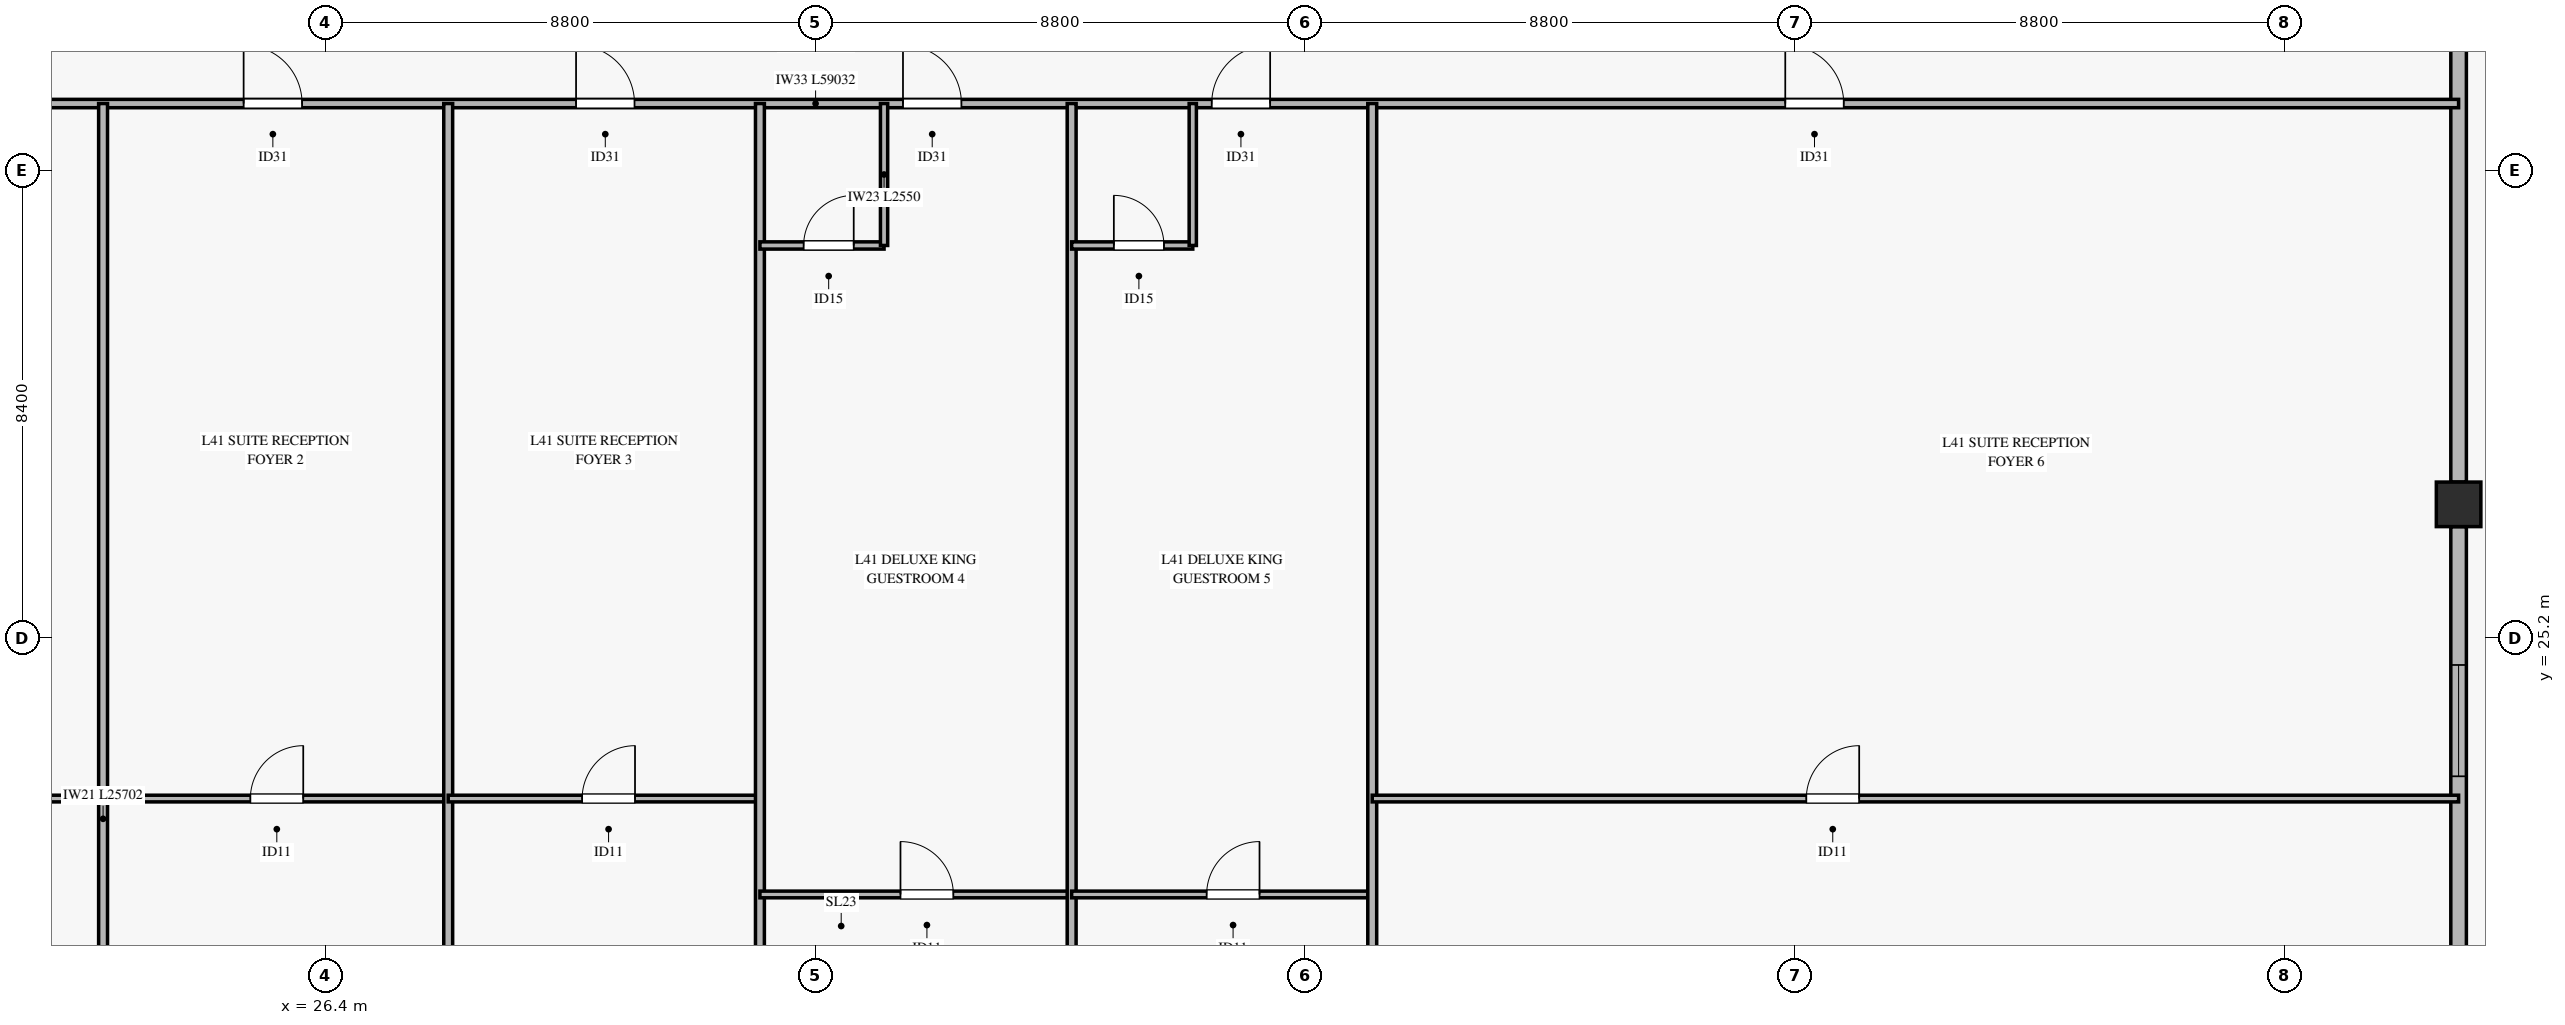
"""IFC4 building model, lengths in metres.
Left out: names, types, materials, properties, quantities, classifications, styles, units other than length and angle.
Written with IfcOpenShell. Run it as: python <this file> out.ifc"""

import sys

from ifc_helpers import new_model, si_unit, direction, frame, frame_2d, origin, origin_2d, place, context, subcontext, project, spatial, rectangle, hollow_rectangle, extrude, source, transform, mapped, element, fill, save


model = new_model("IFC4")
c1 = context("Model", 3, precision=1e-05, world=origin(), true_north=direction((0.0, 1.0)))
c2 = subcontext(c1, "Body", "Model", "MODEL_VIEW")
j1 = project(units=[si_unit("LENGTHUNIT", "METRE"), si_unit("PLANEANGLEUNIT", "RADIAN")], contexts=[c1])
p1 = place(None, origin())
s1 = spatial("IfcSite", under=j1, at=p1, CompositionType="ELEMENT")
p2 = place(p1, origin())
s2 = spatial("IfcBuilding", under=s1, at=p2, CompositionType="ELEMENT")
p3 = place(p2, frame((0.0, 0.0, 166.7)))
s3 = spatial("IfcBuildingStorey", under=s2, at=p3, CompositionType="ELEMENT", Elevation=166.7)
m1 = source(origin(), c2, "Body", "SweptSolid", [
    extrude(hollow_rectangle(XDim=0.8, YDim=0.8, WallThickness=0.036, at=origin_2d()), origin(), (0.0, 0.0, 1.0), 3.289),
])
p4 = place(p3, frame((64.716, 27.599, 0.0), z_axis=(-0.071481516224, 0.08024041437, 0.9942091675), x_axis=(-0.746684793699, -0.66517803546, 0.0)))
e1 = element("IfcColumn", 1, at=p4, inside=s3, PredefinedType="COLUMN", context=c2, shape_type="MappedRepresentation", body=[
    mapped(m1, transform((0.0, 0.0, 0.0), x_axis=(1.0, 0.0, 0.0), y_axis=(0.0, 1.0, 0.0), z_axis=(0.0, 0.0, 1.0), scale=1.0)),
])
p5 = place(p3, frame((64.716, 12.011, 0.0), z_axis=(0.0, 0.0, 1.0), x_axis=(0.0, 1.0, 0.0)))
e2 = element("IfcWall", 2, at=p5, inside=s3, PredefinedType="SOLIDWALL", context=c2, shape_type="SweptSolid", body=[
    extrude(rectangle(XDim=15.188, YDim=0.28, at=frame_2d((7.594, 0.0))), origin(), (0.0, 0.0, 1.0), 2.75),
])
p6 = place(p5, frame((3.189, 0.0, 0.45)))
e3 = element("IfcOpeningElement", 3, at=p6, cuts=e2, PredefinedType="OPENING", context=c2, shape_type="SweptSolid", body=[
    extrude(rectangle(XDim=2.0, YDim=2.0, at=frame_2d((1.0, 1.0))), frame((0.0, 0.15, 0.0), z_axis=(0.0, -1.0, 0.0), x_axis=(1.0, 0.0, 0.0)), (0.0, 0.0, 1.0), 0.3),
])
p7 = place(p5, frame((10.702, 0.0, 0.45)))
e4 = element("IfcOpeningElement", 4, at=p7, cuts=e2, PredefinedType="OPENING", context=c2, shape_type="SweptSolid", body=[
    extrude(rectangle(XDim=2.0, YDim=2.0, at=frame_2d((1.0, 1.0))), frame((0.0, 0.15, 0.0), z_axis=(0.0, -1.0, 0.0), x_axis=(1.0, 0.0, 0.0)), (0.0, 0.0, 1.0), 0.3),
])
p8 = place(p3, frame((64.716, 27.999, 0.0), z_axis=(0.0, 0.0, 1.0), x_axis=(0.0, 1.0, 0.0)))
e5 = element("IfcWall", 5, at=p8, inside=s3, PredefinedType="SOLIDWALL", context=c2, shape_type="SweptSolid", body=[
    extrude(rectangle(XDim=15.188, YDim=0.28, at=frame_2d((7.594, 0.0))), origin(), (0.0, 0.0, 1.0), 2.75),
])
p9 = place(p8, frame((9.856, 0.0, 0.45)))
e6 = element("IfcOpeningElement", 6, at=p9, cuts=e5, PredefinedType="OPENING", context=c2, shape_type="SweptSolid", body=[
    extrude(rectangle(XDim=2.0, YDim=2.0, at=frame_2d((1.0, 1.0))), frame((0.0, 0.15, 0.0), z_axis=(0.0, -1.0, 0.0), x_axis=(1.0, 0.0, 0.0)), (0.0, 0.0, 1.0), 0.3),
])
p10 = place(p3, frame((5.684, 34.8, 0.0), z_axis=(0.0, 0.0, 1.0), x_axis=(1.0, 0.0, 0.0)))
e7 = element("IfcWall", 7, at=p10, inside=s3, PredefinedType="PARTITIONING", context=c2, shape_type="SweptSolid", body=[
    extrude(rectangle(XDim=59.032, YDim=0.15, at=frame_2d((29.516, 0.0))), origin(), (0.0, 0.0, 1.0), 2.455),
])
p11 = place(p10, frame((6.791, 0.0, 0.0)))
e8 = element("IfcOpeningElement", 8, at=p11, cuts=e7, PredefinedType="OPENING", context=c2, shape_type="SweptSolid", body=[
    extrude(rectangle(XDim=1.05, YDim=2.15, at=frame_2d((0.525, 1.075))), frame((0.0, 0.085, 0.0), z_axis=(0.0, -1.0, 0.0), x_axis=(1.0, 0.0, 0.0)), (0.0, 0.0, 1.0), 0.17),
])
p12 = place(p10, frame((19.241, 0.0, 0.0)))
e9 = element("IfcOpeningElement", 9, at=p12, cuts=e7, PredefinedType="OPENING", context=c2, shape_type="SweptSolid", body=[
    extrude(rectangle(XDim=1.05, YDim=2.15, at=frame_2d((0.525, 1.075))), frame((0.0, 0.085, 0.0), z_axis=(0.0, -1.0, 0.0), x_axis=(1.0, 0.0, 0.0)), (0.0, 0.0, 1.0), 0.17),
])
p13 = place(p10, frame((25.213, 0.0, 0.0)))
e10 = element("IfcOpeningElement", 10, at=p13, cuts=e7, PredefinedType="OPENING", context=c2, shape_type="SweptSolid", body=[
    extrude(rectangle(XDim=1.05, YDim=2.15, at=frame_2d((0.525, 1.075))), frame((0.0, 0.085, 0.0), z_axis=(0.0, -1.0, 0.0), x_axis=(1.0, 0.0, 0.0)), (0.0, 0.0, 1.0), 0.17),
])
p14 = place(p10, frame((31.086, 0.0, 0.0)))
e11 = element("IfcOpeningElement", 11, at=p14, cuts=e7, PredefinedType="OPENING", context=c2, shape_type="SweptSolid", body=[
    extrude(rectangle(XDim=1.05, YDim=2.15, at=frame_2d((0.525, 1.075))), frame((0.0, 0.085, 0.0), z_axis=(0.0, -1.0, 0.0), x_axis=(1.0, 0.0, 0.0)), (0.0, 0.0, 1.0), 0.17),
])
p15 = place(p10, frame((36.632, 0.0, 0.0)))
e12 = element("IfcOpeningElement", 12, at=p15, cuts=e7, PredefinedType="OPENING", context=c2, shape_type="SweptSolid", body=[
    extrude(rectangle(XDim=1.05, YDim=2.15, at=frame_2d((0.525, 1.075))), frame((0.0, 0.085, 0.0), z_axis=(0.0, -1.0, 0.0), x_axis=(1.0, 0.0, 0.0)), (0.0, 0.0, 1.0), 0.17),
])
p16 = place(p10, frame((46.936, 0.0, 0.0)))
e13 = element("IfcOpeningElement", 13, at=p16, cuts=e7, PredefinedType="OPENING", context=c2, shape_type="SweptSolid", body=[
    extrude(rectangle(XDim=1.05, YDim=2.15, at=frame_2d((0.525, 1.075))), frame((0.0, 0.085, 0.0), z_axis=(0.0, -1.0, 0.0), x_axis=(1.0, 0.0, 0.0)), (0.0, 0.0, 1.0), 0.17),
])
p17 = place(p3, frame((5.684, 22.313, 0.0), z_axis=(0.0, 0.0, 1.0), x_axis=(1.0, 0.0, 0.0)))
e14 = element("IfcWall", 14, at=p17, inside=s3, PredefinedType="PARTITIONING", context=c2, shape_type="SweptSolid", body=[
    extrude(rectangle(XDim=16.716, YDim=0.12, at=frame_2d((8.358, 0.0))), origin(), (0.0, 0.0, 1.0), 2.455),
])
p18 = place(p17, frame((7.113, 0.0, 0.0)))
e15 = element("IfcOpeningElement", 15, at=p18, cuts=e14, PredefinedType="OPENING", context=c2, shape_type="SweptSolid", body=[
    extrude(rectangle(XDim=0.95, YDim=2.1, at=frame_2d((0.475, 1.05))), frame((0.0, 0.07, 0.0), z_axis=(0.0, -1.0, 0.0), x_axis=(1.0, 0.0, 0.0)), (0.0, 0.0, 1.0), 0.14),
])
p19 = place(p3, frame((22.4, 9.098, 0.0), z_axis=(0.0, 0.0, 1.0), x_axis=(0.0, 1.0, 0.0)))
e16 = element("IfcWall", 16, at=p19, inside=s3, PredefinedType="PARTITIONING", context=c2, shape_type="SweptSolid", body=[
    extrude(rectangle(XDim=25.702, YDim=0.16, at=frame_2d((12.851, 0.0))), origin(), (0.0, 0.0, 1.0), 2.755),
])
p20 = place(p3, frame((22.4, 22.313, 0.0), z_axis=(0.0, 0.0, 1.0), x_axis=(1.0, 0.0, 0.0)))
e17 = element("IfcWall", 17, at=p20, inside=s3, PredefinedType="PARTITIONING", context=c2, shape_type="SweptSolid", body=[
    extrude(rectangle(XDim=6.2, YDim=0.12, at=frame_2d((3.1, 0.0))), origin(), (0.0, 0.0, 1.0), 3.27),
])
p21 = place(p20, frame((2.646, 0.0, 0.0)))
e18 = element("IfcOpeningElement", 18, at=p21, cuts=e17, PredefinedType="OPENING", context=c2, shape_type="SweptSolid", body=[
    extrude(rectangle(XDim=0.95, YDim=2.1, at=frame_2d((0.475, 1.05))), frame((0.0, 0.07, 0.0), z_axis=(0.0, -1.0, 0.0), x_axis=(1.0, 0.0, 0.0)), (0.0, 0.0, 1.0), 0.14),
])
p22 = place(p3, frame((28.6, 9.098, 0.0), z_axis=(0.0, 0.0, 1.0), x_axis=(0.0, 1.0, 0.0)))
e19 = element("IfcWall", 19, at=p22, inside=s3, PredefinedType="PARTITIONING", context=c2, shape_type="SweptSolid", body=[
    extrude(rectangle(XDim=25.702, YDim=0.16, at=frame_2d((12.851, 0.0))), origin(), (0.0, 0.0, 1.0), 2.755),
])
p23 = place(p3, frame((28.6, 22.313, 0.0), z_axis=(0.0, 0.0, 1.0), x_axis=(1.0, 0.0, 0.0)))
e20 = element("IfcWall", 20, at=p23, inside=s3, PredefinedType="PARTITIONING", context=c2, shape_type="SweptSolid", body=[
    extrude(rectangle(XDim=5.6, YDim=0.12, at=frame_2d((2.8, 0.0))), origin(), (0.0, 0.0, 1.0), 2.455),
])
p24 = place(p23, frame((2.406, 0.0, 0.0)))
e21 = element("IfcOpeningElement", 21, at=p24, cuts=e20, PredefinedType="OPENING", context=c2, shape_type="SweptSolid", body=[
    extrude(rectangle(XDim=0.95, YDim=2.1, at=frame_2d((0.475, 1.05))), frame((0.0, 0.07, 0.0), z_axis=(0.0, -1.0, 0.0), x_axis=(1.0, 0.0, 0.0)), (0.0, 0.0, 1.0), 0.14),
])
p25 = place(p3, frame((34.2, 9.098, 0.0), z_axis=(0.0, 0.0, 1.0), x_axis=(0.0, 1.0, 0.0)))
e22 = element("IfcWall", 22, at=p25, inside=s3, PredefinedType="PARTITIONING", context=c2, shape_type="SweptSolid", body=[
    extrude(rectangle(XDim=25.702, YDim=0.16, at=frame_2d((12.851, 0.0))), origin(), (0.0, 0.0, 1.0), 2.755),
])
p26 = place(p3, frame((34.2, 32.25, 0.0), z_axis=(0.0, 0.0, 1.0), x_axis=(1.0, 0.0, 0.0)))
e23 = element("IfcWall", 23, at=p26, inside=s3, PredefinedType="PARTITIONING", context=c2, shape_type="SweptSolid", body=[
    extrude(rectangle(XDim=2.23, YDim=0.13, at=frame_2d((1.115, 0.0))), origin(), (0.0, 0.0, 1.0), 3.27),
])
p27 = place(p26, frame((0.785, 0.0, 0.0)))
e24 = element("IfcOpeningElement", 24, at=p27, cuts=e23, PredefinedType="OPENING", context=c2, shape_type="SweptSolid", body=[
    extrude(rectangle(XDim=0.9, YDim=2.1, at=frame_2d((0.45, 1.05))), frame((0.0, 0.075, 0.0), z_axis=(0.0, -1.0, 0.0), x_axis=(1.0, 0.0, 0.0)), (0.0, 0.0, 1.0), 0.15),
])
p28 = place(p3, frame((36.43, 32.25, 0.0), z_axis=(0.0, 0.0, 1.0), x_axis=(0.0, 1.0, 0.0)))
e25 = element("IfcWall", 25, at=p28, inside=s3, PredefinedType="PARTITIONING", context=c2, shape_type="SweptSolid", body=[
    extrude(rectangle(XDim=2.55, YDim=0.13, at=frame_2d((1.275, 0.0))), origin(), (0.0, 0.0, 1.0), 2.805),
])
p29 = place(p3, frame((34.2, 20.59, 0.0), z_axis=(0.0, 0.0, 1.0), x_axis=(1.0, 0.0, 0.0)))
e26 = element("IfcWall", 26, at=p29, inside=s3, PredefinedType="PARTITIONING", context=c2, shape_type="SweptSolid", body=[
    extrude(rectangle(XDim=5.6, YDim=0.12, at=frame_2d((2.8, 0.0))), origin(), (0.0, 0.0, 1.0), 2.455),
])
p30 = place(p29, frame((2.525, 0.0, 0.0)))
e27 = element("IfcOpeningElement", 27, at=p30, cuts=e26, PredefinedType="OPENING", context=c2, shape_type="SweptSolid", body=[
    extrude(rectangle(XDim=0.95, YDim=2.1, at=frame_2d((0.475, 1.05))), frame((0.0, 0.07, 0.0), z_axis=(0.0, -1.0, 0.0), x_axis=(1.0, 0.0, 0.0)), (0.0, 0.0, 1.0), 0.14),
])
p31 = place(p3, frame((39.8, 9.098, 0.0), z_axis=(0.0, 0.0, 1.0), x_axis=(0.0, 1.0, 0.0)))
e28 = element("IfcWall", 28, at=p31, inside=s3, PredefinedType="PARTITIONING", context=c2, shape_type="SweptSolid", body=[
    extrude(rectangle(XDim=25.702, YDim=0.16, at=frame_2d((12.851, 0.0))), origin(), (0.0, 0.0, 1.0), 2.755),
])
p32 = place(p3, frame((39.8, 32.25, 0.0), z_axis=(0.0, 0.0, 1.0), x_axis=(1.0, 0.0, 0.0)))
e29 = element("IfcWall", 29, at=p32, inside=s3, PredefinedType="PARTITIONING", context=c2, shape_type="SweptSolid", body=[
    extrude(rectangle(XDim=2.176, YDim=0.13, at=frame_2d((1.088, 0.0))), origin(), (0.0, 0.0, 1.0), 3.27),
])
p33 = place(p32, frame((0.758, 0.0, 0.0)))
e30 = element("IfcOpeningElement", 30, at=p33, cuts=e29, PredefinedType="OPENING", context=c2, shape_type="SweptSolid", body=[
    extrude(rectangle(XDim=0.9, YDim=2.1, at=frame_2d((0.45, 1.05))), frame((0.0, 0.075, 0.0), z_axis=(0.0, -1.0, 0.0), x_axis=(1.0, 0.0, 0.0)), (0.0, 0.0, 1.0), 0.15),
])
p34 = place(p3, frame((41.976, 32.25, 0.0), z_axis=(0.0, 0.0, 1.0), x_axis=(0.0, 1.0, 0.0)))
e31 = element("IfcWall", 31, at=p34, inside=s3, PredefinedType="PARTITIONING", context=c2, shape_type="SweptSolid", body=[
    extrude(rectangle(XDim=2.55, YDim=0.13, at=frame_2d((1.275, 0.0))), origin(), (0.0, 0.0, 1.0), 2.805),
])
p35 = place(p3, frame((39.8, 20.59, 0.0), z_axis=(0.0, 0.0, 1.0), x_axis=(1.0, 0.0, 0.0)))
e32 = element("IfcWall", 32, at=p35, inside=s3, PredefinedType="PARTITIONING", context=c2, shape_type="SweptSolid", body=[
    extrude(rectangle(XDim=5.4, YDim=0.12, at=frame_2d((2.7, 0.0))), origin(), (0.0, 0.0, 1.0), 2.455),
])
p36 = place(p35, frame((2.425, 0.0, 0.0)))
e33 = element("IfcOpeningElement", 33, at=p36, cuts=e32, PredefinedType="OPENING", context=c2, shape_type="SweptSolid", body=[
    extrude(rectangle(XDim=0.95, YDim=2.1, at=frame_2d((0.475, 1.05))), frame((0.0, 0.07, 0.0), z_axis=(0.0, -1.0, 0.0), x_axis=(1.0, 0.0, 0.0)), (0.0, 0.0, 1.0), 0.14),
])
p37 = place(p3, frame((45.2, 9.098, 0.0), z_axis=(0.0, 0.0, 1.0), x_axis=(0.0, 1.0, 0.0)))
e34 = element("IfcWall", 34, at=p37, inside=s3, PredefinedType="PARTITIONING", context=c2, shape_type="SweptSolid", body=[
    extrude(rectangle(XDim=25.702, YDim=0.16, at=frame_2d((12.851, 0.0))), origin(), (0.0, 0.0, 1.0), 2.755),
])
p38 = place(p3, frame((45.2, 22.313, 0.0), z_axis=(0.0, 0.0, 1.0), x_axis=(1.0, 0.0, 0.0)))
e35 = element("IfcWall", 35, at=p38, inside=s3, PredefinedType="PARTITIONING", context=c2, shape_type="SweptSolid", body=[
    extrude(rectangle(XDim=19.516, YDim=0.12, at=frame_2d((9.758, 0.0))), origin(), (0.0, 0.0, 1.0), 2.455),
])
p39 = place(p38, frame((7.798, 0.0, 0.0)))
e36 = element("IfcOpeningElement", 36, at=p39, cuts=e35, PredefinedType="OPENING", context=c2, shape_type="SweptSolid", body=[
    extrude(rectangle(XDim=0.95, YDim=2.1, at=frame_2d((0.475, 1.05))), frame((0.0, 0.07, 0.0), z_axis=(0.0, -1.0, 0.0), x_axis=(1.0, 0.0, 0.0)), (0.0, 0.0, 1.0), 0.14),
])
m2 = source(origin(), c2, "Body", "SweptSolid", [
    extrude(rectangle(XDim=2.0, YDim=2.0, at=frame_2d((1.0, 1.0))), frame((0.0, 0.03, 0.0), z_axis=(0.0, -1.0, 0.0), x_axis=(1.0, 0.0, 0.0)), (0.0, 0.0, 1.0), 0.06),
])
p40 = place(p7, origin())
e37 = element("IfcWindow", 37, at=p40, inside=s3, PartitioningType="SINGLE_PANEL", PredefinedType="WINDOW", context=c2, shape_type="MappedRepresentation", body=[
    mapped(m2, transform((0.0, 0.0, 0.0), x_axis=(1.0, 0.0, 0.0), y_axis=(0.0, 1.0, 0.0), z_axis=(0.0, 0.0, 1.0), scale=1.0)),
])
fill(e4, e37)
m3 = source(origin(), c2, "Body", "SweptSolid", [
    extrude(rectangle(XDim=1.05, YDim=2.15, at=frame_2d((0.525, 1.075))), frame((0.0, 0.025, 0.0), z_axis=(0.0, -1.0, 0.0), x_axis=(1.0, 0.0, 0.0)), (0.0, 0.0, 1.0), 0.05),
])
p41 = place(p12, origin())
e38 = element("IfcDoor", 38, at=p41, inside=s3, OperationType="SINGLE_SWING_LEFT", PredefinedType="DOOR", context=c2, shape_type="MappedRepresentation", body=[
    mapped(m3, transform((0.0, 0.0, 0.0), x_axis=(1.0, 0.0, 0.0), y_axis=(0.0, 1.0, 0.0), z_axis=(0.0, 0.0, 1.0), scale=1.0)),
])
fill(e9, e38)
m4 = source(origin(), c2, "Body", "SweptSolid", [
    extrude(rectangle(XDim=0.95, YDim=2.1, at=frame_2d((0.475, 1.05))), frame((0.0, 0.025, 0.0), z_axis=(0.0, -1.0, 0.0), x_axis=(1.0, 0.0, 0.0)), (0.0, 0.0, 1.0), 0.05),
])
p42 = place(p21, origin())
e39 = element("IfcDoor", 39, at=p42, inside=s3, OperationType="SINGLE_SWING_RIGHT", PredefinedType="DOOR", context=c2, shape_type="MappedRepresentation", body=[
    mapped(m4, transform((0.0, 0.0, 0.0), x_axis=(1.0, 0.0, 0.0), y_axis=(0.0, 1.0, 0.0), z_axis=(0.0, 0.0, 1.0), scale=1.0)),
])
fill(e18, e39)
p43 = place(p13, origin())
e40 = element("IfcDoor", 40, at=p43, inside=s3, OperationType="SINGLE_SWING_LEFT", PredefinedType="DOOR", context=c2, shape_type="MappedRepresentation", body=[
    mapped(m3, transform((0.0, 0.0, 0.0), x_axis=(1.0, 0.0, 0.0), y_axis=(0.0, 1.0, 0.0), z_axis=(0.0, 0.0, 1.0), scale=1.0)),
])
fill(e10, e40)
p44 = place(p24, origin())
e41 = element("IfcDoor", 41, at=p44, inside=s3, OperationType="SINGLE_SWING_RIGHT", PredefinedType="DOOR", context=c2, shape_type="MappedRepresentation", body=[
    mapped(m4, transform((0.0, 0.0, 0.0), x_axis=(1.0, 0.0, 0.0), y_axis=(0.0, 1.0, 0.0), z_axis=(0.0, 0.0, 1.0), scale=1.0)),
])
fill(e21, e41)
p45 = place(p14, origin())
e42 = element("IfcDoor", 42, at=p45, inside=s3, OperationType="SINGLE_SWING_LEFT", PredefinedType="DOOR", context=c2, shape_type="MappedRepresentation", body=[
    mapped(m3, transform((0.0, 0.0, 0.0), x_axis=(1.0, 0.0, 0.0), y_axis=(0.0, 1.0, 0.0), z_axis=(0.0, 0.0, 1.0), scale=1.0)),
])
fill(e11, e42)
m5 = source(origin(), c2, "Body", "SweptSolid", [
    extrude(rectangle(XDim=0.9, YDim=2.1, at=frame_2d((0.45, 1.05))), frame((0.0, 0.025, 0.0), z_axis=(0.0, -1.0, 0.0), x_axis=(1.0, 0.0, 0.0)), (0.0, 0.0, 1.0), 0.05),
])
p46 = place(p27, origin())
e43 = element("IfcDoor", 43, at=p46, inside=s3, OperationType="SINGLE_SWING_RIGHT", PredefinedType="DOOR", context=c2, shape_type="MappedRepresentation", body=[
    mapped(m5, transform((0.0, 0.0, 0.0), x_axis=(1.0, 0.0, 0.0), y_axis=(0.0, 1.0, 0.0), z_axis=(0.0, 0.0, 1.0), scale=1.0)),
])
fill(e24, e43)
p47 = place(p30, origin())
e44 = element("IfcDoor", 44, at=p47, inside=s3, OperationType="SINGLE_SWING_LEFT", PredefinedType="DOOR", context=c2, shape_type="MappedRepresentation", body=[
    mapped(m4, transform((0.0, 0.0, 0.0), x_axis=(1.0, 0.0, 0.0), y_axis=(0.0, 1.0, 0.0), z_axis=(0.0, 0.0, 1.0), scale=1.0)),
])
fill(e27, e44)
p48 = place(p15, origin())
e45 = element("IfcDoor", 45, at=p48, inside=s3, OperationType="SINGLE_SWING_RIGHT", PredefinedType="DOOR", context=c2, shape_type="MappedRepresentation", body=[
    mapped(m3, transform((0.0, 0.0, 0.0), x_axis=(1.0, 0.0, 0.0), y_axis=(0.0, 1.0, 0.0), z_axis=(0.0, 0.0, 1.0), scale=1.0)),
])
fill(e12, e45)
p49 = place(p33, origin())
e46 = element("IfcDoor", 46, at=p49, inside=s3, OperationType="SINGLE_SWING_LEFT", PredefinedType="DOOR", context=c2, shape_type="MappedRepresentation", body=[
    mapped(m5, transform((0.0, 0.0, 0.0), x_axis=(1.0, 0.0, 0.0), y_axis=(0.0, 1.0, 0.0), z_axis=(0.0, 0.0, 1.0), scale=1.0)),
])
fill(e30, e46)
p50 = place(p36, origin())
e47 = element("IfcDoor", 47, at=p50, inside=s3, OperationType="SINGLE_SWING_RIGHT", PredefinedType="DOOR", context=c2, shape_type="MappedRepresentation", body=[
    mapped(m4, transform((0.0, 0.0, 0.0), x_axis=(1.0, 0.0, 0.0), y_axis=(0.0, 1.0, 0.0), z_axis=(0.0, 0.0, 1.0), scale=1.0)),
])
fill(e33, e47)
p51 = place(p16, origin())
e48 = element("IfcDoor", 48, at=p51, inside=s3, OperationType="SINGLE_SWING_LEFT", PredefinedType="DOOR", context=c2, shape_type="MappedRepresentation", body=[
    mapped(m3, transform((0.0, 0.0, 0.0), x_axis=(1.0, 0.0, 0.0), y_axis=(0.0, 1.0, 0.0), z_axis=(0.0, 0.0, 1.0), scale=1.0)),
])
fill(e13, e48)
p52 = place(p39, origin())
e49 = element("IfcDoor", 49, at=p52, inside=s3, OperationType="SINGLE_SWING_RIGHT", PredefinedType="DOOR", context=c2, shape_type="MappedRepresentation", body=[
    mapped(m4, transform((0.0, 0.0, 0.0), x_axis=(1.0, 0.0, 0.0), y_axis=(0.0, 1.0, 0.0), z_axis=(0.0, 0.0, 1.0), scale=1.0)),
])
fill(e36, e49)
save(model, sys.argv[1])
